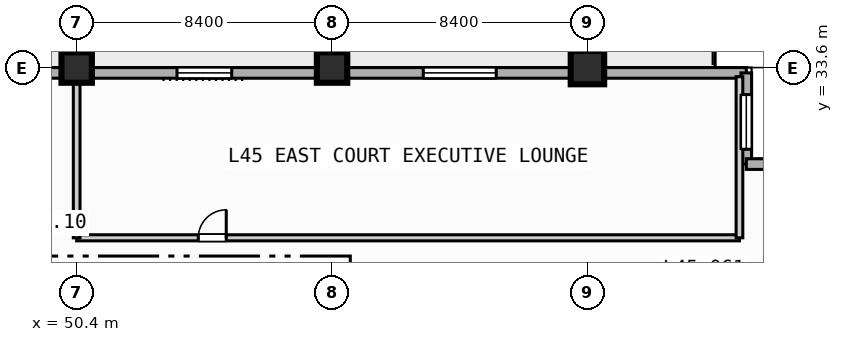
"""IFC4 building model, lengths in metres.
Left out: names, types, materials, properties, quantities, classifications, styles, units other than length and angle.
Written with IfcOpenShell. Run it as: python <this file> out.ifc"""

import sys

from ifc_helpers import new_model, si_unit, direction, frame, frame_2d, origin, origin_2d, place, context, subcontext, project, spatial, rectangle, extrude, element, fill, save


model = new_model("IFC4")
c1 = context("Model", 3, precision=1e-05, world=origin(), true_north=direction((0.0, 1.0)))
c2 = subcontext(c1, "Body", "Model", "MODEL_VIEW")
j1 = project(units=[si_unit("LENGTHUNIT", "METRE"), si_unit("PLANEANGLEUNIT", "RADIAN")], contexts=[c1])
p1 = place(None, origin())
s1 = spatial("IfcSite", under=j1, at=p1, CompositionType="ELEMENT")
p2 = place(p1, origin())
s2 = spatial("IfcBuilding", under=s1, at=p2, CompositionType="ELEMENT")
p3 = place(p2, frame((0.0, 0.0, 186.5)))
s3 = spatial("IfcBuildingStorey", under=s2, at=p3, CompositionType="ELEMENT", Elevation=186.5)
for number, where, z_axis, x_axis in (
    (1, (50.4, 33.6, 0.0), (0.0, 0.0, 1.0), (1.0, 0.0, 0.0)),
    (2, (58.8, 33.6, 0.0), (0.0, 0.0, 1.0), (1.0, 0.0, 0.0)),
):
    element("IfcColumn", number, at=place(p3, frame(where, z_axis=z_axis, x_axis=x_axis)), inside=s3, PredefinedType="COLUMN", context=c2, shape_type="SweptSolid", body=[
        extrude(rectangle(XDim=1.0, YDim=1.0, at=origin_2d()), origin(), (0.0, 0.0, 1.0), 3.7),
    ])
p4 = place(p3, frame((67.2, 33.6, 0.0), z_axis=(0.0, 0.0, 1.0), x_axis=(1.0, 0.0, 0.0)))
e3 = element("IfcColumn", 3, at=p4, inside=s3, PredefinedType="COLUMN", context=c2, shape_type="SweptSolid", body=[
    extrude(rectangle(XDim=1.1, YDim=1.1, at=origin_2d()), origin(), (0.0, 0.0, 1.0), 3.7),
])
p5 = place(p3, frame((33.425, 33.425, 0.0), z_axis=(0.0, 0.0, 1.0), x_axis=(1.0, 0.0, 0.0)))
e4 = element("IfcWall", 4, at=p5, inside=s3, PredefinedType="STANDARD", context=c2, shape_type="SweptSolid", body=[
    extrude(rectangle(XDim=39.0, YDim=0.35, at=frame_2d((19.5, 0.0))), origin(), (0.0, 0.0, 1.0), 3.47),
])
p6 = place(p5, frame((12.075, 0.0, 0.0)))
e5 = element("IfcOpeningElement", 5, at=p6, cuts=e4, PredefinedType="OPENING", context=c2, shape_type="SweptSolid", body=[
    extrude(rectangle(XDim=1.4, YDim=2.2, at=frame_2d((0.7, 1.1))), frame((0.0, 0.185, 0.0), z_axis=(0.0, -1.0, 0.0), x_axis=(1.0, 0.0, 0.0)), (0.0, 0.0, 1.0), 0.37),
])
p7 = place(p5, frame((20.275, 0.0, 0.85)))
e6 = element("IfcOpeningElement", 6, at=p7, cuts=e4, PredefinedType="OPENING", context=c2, shape_type="SweptSolid", body=[
    extrude(rectangle(XDim=1.8, YDim=1.8, at=frame_2d((0.9, 0.9))), frame((0.0, 0.185, 0.0), z_axis=(0.0, -1.0, 0.0), x_axis=(1.0, 0.0, 0.0)), (0.0, 0.0, 1.0), 0.37),
])
p8 = place(p5, frame((28.375, 0.0, 0.85)))
e7 = element("IfcOpeningElement", 7, at=p8, cuts=e4, PredefinedType="OPENING", context=c2, shape_type="SweptSolid", body=[
    extrude(rectangle(XDim=2.4, YDim=1.95, at=frame_2d((1.2, 0.975))), frame((0.0, 0.185, 0.0), z_axis=(0.0, -1.0, 0.0), x_axis=(1.0, 0.0, 0.0)), (0.0, 0.0, 1.0), 0.37),
])
p9 = place(p3, frame((72.425, 33.425, 0.0), z_axis=(0.0, 0.0, 1.0), x_axis=(0.0, -1.0, 0.0)))
e8 = element("IfcWall", 8, at=p9, inside=s3, PredefinedType="STANDARD", context=c2, shape_type="SweptSolid", body=[
    extrude(rectangle(XDim=3.0, YDim=0.35, at=frame_2d((1.5, 0.0))), origin(), (0.0, 0.0, 1.0), 3.47),
])
p10 = place(p9, frame((0.712, 0.0, 0.85)))
e9 = element("IfcOpeningElement", 9, at=p10, cuts=e8, PredefinedType="OPENING", context=c2, shape_type="SweptSolid", body=[
    extrude(rectangle(XDim=1.8, YDim=1.8, at=frame_2d((0.9, 0.9))), frame((0.0, 0.185, 0.0), z_axis=(0.0, -1.0, 0.0), x_axis=(1.0, 0.0, 0.0)), (0.0, 0.0, 1.0), 0.37),
])
p11 = place(p3, frame((72.425, 30.425, 0.0), z_axis=(0.0, 0.0, 1.0), x_axis=(1.0, 0.0, 0.0)))
e10 = element("IfcWall", 10, at=p11, inside=s3, PredefinedType="STANDARD", context=c2, shape_type="SweptSolid", body=[
    extrude(rectangle(XDim=3.0, YDim=0.35, at=frame_2d((1.5, 0.0))), origin(), (0.0, 0.0, 1.0), 3.47),
])
p12 = place(p3, frame((50.4, 28.0, 0.0), z_axis=(0.0, 0.0, 1.0), x_axis=(1.0, 0.0, 0.0)))
e11 = element("IfcWall", 11, at=p12, inside=s3, PredefinedType="PARTITIONING", context=c2, shape_type="SweptSolid", body=[
    extrude(rectangle(XDim=21.8, YDim=0.2, at=frame_2d((10.9, 0.0))), origin(), (0.0, 0.0, 1.0), 3.47),
])
p13 = place(p12, frame((4.0, 0.0, 0.0)))
e12 = element("IfcOpeningElement", 12, at=p13, cuts=e11, PredefinedType="OPENING", context=c2, shape_type="SweptSolid", body=[
    extrude(rectangle(XDim=0.92, YDim=2.1, at=frame_2d((0.46, 1.05))), frame((0.0, 0.11, 0.0), z_axis=(0.0, -1.0, 0.0), x_axis=(1.0, 0.0, 0.0)), (0.0, 0.0, 1.0), 0.22),
])
p14 = place(p3, frame((50.4, 28.0, 0.0), z_axis=(0.0, 0.0, 1.0), x_axis=(0.0, 1.0, 0.0)))
e13 = element("IfcWall", 13, at=p14, inside=s3, PredefinedType="PARTITIONING", context=c2, shape_type="SweptSolid", body=[
    extrude(rectangle(XDim=5.3, YDim=0.22, at=frame_2d((2.65, 0.0))), origin(), (0.0, 0.0, 1.0), 3.116),
])
p15 = place(p3, frame((72.2, 28.0, 0.0), z_axis=(0.0, 0.0, 1.0), x_axis=(0.0, 1.0, 0.0)))
e14 = element("IfcWall", 14, at=p15, inside=s3, PredefinedType="PARTITIONING", context=c2, shape_type="SweptSolid", body=[
    extrude(rectangle(XDim=5.3, YDim=0.22, at=frame_2d((2.65, 0.0))), origin(), (0.0, 0.0, 1.0), 3.47),
])
p16 = place(p7, origin())
e15 = element("IfcWindow", 15, at=p16, inside=s3, PartitioningType="SINGLE_PANEL", PredefinedType="WINDOW", context=c2, shape_type="SweptSolid", body=[
    extrude(rectangle(XDim=1.8, YDim=1.8, at=frame_2d((0.9, 0.9))), frame((0.0, 0.03, 0.0), z_axis=(0.0, -1.0, 0.0), x_axis=(1.0, 0.0, 0.0)), (0.0, 0.0, 1.0), 0.06),
])
fill(e6, e15)
p17 = place(p8, origin())
e16 = element("IfcWindow", 16, at=p17, inside=s3, PartitioningType="SINGLE_PANEL", PredefinedType="WINDOW", context=c2, shape_type="SweptSolid", body=[
    extrude(rectangle(XDim=2.4, YDim=1.95, at=frame_2d((1.2, 0.975))), frame((0.0, 0.03, 0.0), z_axis=(0.0, -1.0, 0.0), x_axis=(1.0, 0.0, 0.0)), (0.0, 0.0, 1.0), 0.06),
])
fill(e7, e16)
p18 = place(p10, origin())
e17 = element("IfcWindow", 17, at=p18, inside=s3, PartitioningType="SINGLE_PANEL", PredefinedType="WINDOW", context=c2, shape_type="SweptSolid", body=[
    extrude(rectangle(XDim=1.8, YDim=1.8, at=frame_2d((0.9, 0.9))), frame((0.0, 0.03, 0.0), z_axis=(0.0, -1.0, 0.0), x_axis=(1.0, 0.0, 0.0)), (0.0, 0.0, 1.0), 0.06),
])
fill(e9, e17)
p19 = place(p13, origin())
e18 = element("IfcDoor", 18, at=p19, inside=s3, OperationType="SINGLE_SWING_RIGHT", PredefinedType="DOOR", context=c2, shape_type="SweptSolid", body=[
    extrude(rectangle(XDim=0.92, YDim=2.1, at=frame_2d((0.46, 1.05))), frame((0.0, 0.025, 0.0), z_axis=(0.0, -1.0, 0.0), x_axis=(1.0, 0.0, 0.0)), (0.0, 0.0, 1.0), 0.05),
])
fill(e12, e18)
save(model, sys.argv[1])
